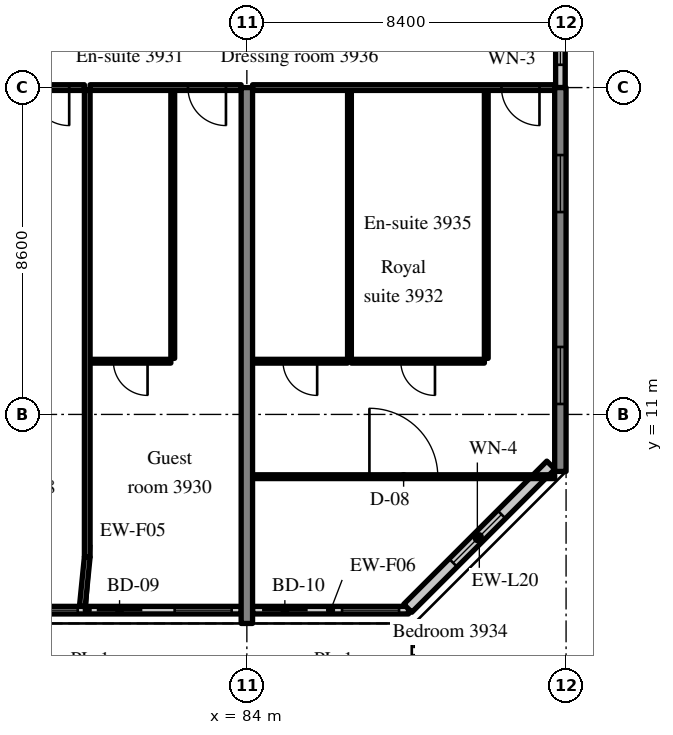
"""IFC4 building model, lengths in metres.
Left out: names, types, materials, properties, quantities, classifications, styles, units other than length and angle.
Written with IfcOpenShell. Run it as: python <this file> out.ifc"""

import sys

from ifc_helpers import new_model, si_unit, direction, frame, frame_2d, origin, place, context, subcontext, project, spatial, rectangle, extrude, source, transform, mapped, element, fill, save


model = new_model("IFC4")
c1 = context("Model", 3, precision=1e-05, world=origin(), true_north=direction((0.0, 1.0)))
c2 = subcontext(c1, "Body", "Model", "MODEL_VIEW")
j1 = project(units=[si_unit("LENGTHUNIT", "METRE"), si_unit("PLANEANGLEUNIT", "RADIAN")], contexts=[c1])
p1 = place(None, origin())
s1 = spatial("IfcSite", under=j1, at=p1, CompositionType="ELEMENT")
p2 = place(p1, origin())
s2 = spatial("IfcBuilding", under=s1, at=p2, CompositionType="ELEMENT")
p3 = place(p2, frame((0.0, 0.0, 163.0)))
s3 = spatial("IfcBuildingStorey", under=s2, at=p3, CompositionType="ELEMENT", Elevation=163.0)
m1 = source(origin(), c2, "Body", "SweptSolid", [
    extrude(rectangle(XDim=14.1, YDim=0.3, at=frame_2d((7.05, 0.0))), origin(), (0.0, 0.0, 1.0), 3.52),
])
p4 = place(p3, frame((84.0, 5.5, 0.0), z_axis=(0.0, 0.0, 1.0), x_axis=(0.0, 1.0, 0.0)))
e1 = element("IfcWall", 1, at=p4, inside=s3, PredefinedType="SHEAR", context=c2, shape_type="MappedRepresentation", body=[
    mapped(m1, transform((0.0, 0.0, 0.0), scale=1.0)),
])
m2 = source(origin(), c2, "Body", "SweptSolid", [
    extrude(rectangle(XDim=10.1, YDim=0.3, at=frame_2d((5.05, 0.0))), origin(), (0.0, 0.0, 1.0), 3.52),
])
p5 = place(p3, frame((92.25, 9.5, 0.0), z_axis=(0.0, 0.0, 1.0), x_axis=(0.0, 1.0, 0.0)))
e2 = element("IfcWall", 2, at=p5, inside=s3, PredefinedType="SHEAR", context=c2, shape_type="MappedRepresentation", body=[
    mapped(m2, transform((0.0, 0.0, 0.0), scale=1.0)),
])
m3 = source(origin(), c2, "Body", "SweptSolid", [
    extrude(rectangle(XDim=1.5, YDim=1.5, at=frame_2d((0.75, 0.75))), frame((0.0, 0.16, 0.0), z_axis=(0.0, -1.0, 0.0), x_axis=(1.0, 0.0, 0.0)), (0.0, 0.0, 1.0), 0.32),
])
p6 = place(p5, frame((1.775, 0.0, 0.9)))
e3 = element("IfcOpeningElement", 3, at=p6, cuts=e2, PredefinedType="OPENING", context=c2, shape_type="MappedRepresentation", body=[
    mapped(m3, transform((0.0, 0.0, 0.0), scale=1.0)),
])
p7 = place(p5, frame((6.825, 0.0, 0.9)))
e4 = element("IfcOpeningElement", 4, at=p7, cuts=e2, PredefinedType="OPENING", context=c2, shape_type="MappedRepresentation", body=[
    mapped(m3, transform((0.0, 0.0, 0.0), scale=1.0)),
])
m4 = source(origin(), c2, "Body", "SweptSolid", [
    extrude(rectangle(XDim=8.1, YDim=0.2, at=frame_2d((4.05, 0.0))), origin(), (0.0, 0.0, 1.0), 2.87),
])
p8 = place(p3, frame((75.75, 5.85, 0.0), z_axis=(0.0, 0.0, 1.0), x_axis=(1.0, 0.0, 0.0)))
e5 = element("IfcWall", 5, at=p8, inside=s3, PredefinedType="SOLIDWALL", context=c2, shape_type="MappedRepresentation", body=[
    mapped(m4, transform((0.0, 0.0, 0.0), scale=1.0)),
])
m5 = source(origin(), c2, "Body", "SweptSolid", [
    extrude(rectangle(XDim=1.2, YDim=2.4, at=frame_2d((0.6, 1.2))), frame((0.0, 0.11, 0.0), z_axis=(0.0, -1.0, 0.0), x_axis=(1.0, 0.0, 0.0)), (0.0, 0.0, 1.0), 0.22),
])
p9 = place(p8, frame((0.25, 0.0, 0.0)))
e6 = element("IfcOpeningElement", 6, at=p9, cuts=e5, PredefinedType="OPENING", context=c2, shape_type="MappedRepresentation", body=[
    mapped(m5, transform((0.0, 0.0, 0.0), scale=1.0)),
])
m6 = source(origin(), c2, "Body", "SweptSolid", [
    extrude(rectangle(XDim=1.5, YDim=1.5, at=frame_2d((0.75, 0.75))), frame((0.0, 0.11, 0.0), z_axis=(0.0, -1.0, 0.0), x_axis=(1.0, 0.0, 0.0)), (0.0, 0.0, 1.0), 0.22),
])
p10 = place(p8, frame((2.3, 0.0, 0.9)))
e7 = element("IfcOpeningElement", 7, at=p10, cuts=e5, PredefinedType="OPENING", context=c2, shape_type="MappedRepresentation", body=[
    mapped(m6, transform((0.0, 0.0, 0.0), scale=1.0)),
])
p11 = place(p8, frame((4.3, 0.0, 0.0)))
e8 = element("IfcOpeningElement", 8, at=p11, cuts=e5, PredefinedType="OPENING", context=c2, shape_type="MappedRepresentation", body=[
    mapped(m5, transform((0.0, 0.0, 0.0), scale=1.0)),
])
p12 = place(p8, frame((6.35, 0.0, 0.9)))
e9 = element("IfcOpeningElement", 9, at=p12, cuts=e5, PredefinedType="OPENING", context=c2, shape_type="MappedRepresentation", body=[
    mapped(m6, transform((0.0, 0.0, 0.0), scale=1.0)),
])
m7 = source(origin(), c2, "Body", "SweptSolid", [
    extrude(rectangle(XDim=4.105, YDim=0.2, at=frame_2d((2.052, 0.0))), origin(), (0.0, 0.0, 1.0), 2.87),
])
p13 = place(p3, frame((84.15, 5.85, 0.0), z_axis=(0.0, 0.0, 1.0), x_axis=(1.0, 0.0, 0.0)))
e10 = element("IfcWall", 10, at=p13, inside=s3, PredefinedType="SOLIDWALL", context=c2, shape_type="MappedRepresentation", body=[
    mapped(m7, transform((0.0, 0.0, 0.0), scale=1.0)),
])
p14 = place(p13, frame((0.25, 0.0, 0.0)))
e11 = element("IfcOpeningElement", 11, at=p14, cuts=e10, PredefinedType="OPENING", context=c2, shape_type="MappedRepresentation", body=[
    mapped(m5, transform((0.0, 0.0, 0.0), scale=1.0)),
])
p15 = place(p13, frame((2.355, 0.0, 0.9)))
e12 = element("IfcOpeningElement", 12, at=p15, cuts=e10, PredefinedType="OPENING", context=c2, shape_type="MappedRepresentation", body=[
    mapped(m6, transform((0.0, 0.0, 0.0), scale=1.0)),
])
m8 = source(origin(), c2, "Body", "SweptSolid", [
    extrude(rectangle(XDim=5.326, YDim=0.3, at=frame_2d((2.663, 0.0))), origin(), (0.0, 0.0, 1.0), 3.52),
])
p16 = place(p3, frame((88.234, 5.9, 0.0), z_axis=(0.0, 0.0, 1.0), x_axis=(0.707083859269, 0.707129702361, 0.0)))
e13 = element("IfcWall", 13, at=p16, inside=s3, PredefinedType="SOLIDWALL", context=c2, shape_type="MappedRepresentation", body=[
    mapped(m8, transform((0.0, 0.0, 0.0), scale=1.0)),
])
m9 = source(origin(), c2, "Body", "SweptSolid", [
    extrude(rectangle(XDim=1.8, YDim=1.5, at=frame_2d((0.9, 0.75))), frame((0.0, 0.16, 0.0), z_axis=(0.0, -1.0, 0.0), x_axis=(1.0, 0.0, 0.0)), (0.0, 0.0, 1.0), 0.32),
])
p17 = place(p16, frame((1.689, 0.0, 0.9)))
e14 = element("IfcOpeningElement", 14, at=p17, cuts=e13, PredefinedType="OPENING", context=c2, shape_type="MappedRepresentation", body=[
    mapped(m9, transform((0.0, 0.0, 0.0), scale=1.0)),
])
m10 = source(origin(), c2, "Body", "SweptSolid", [
    extrude(rectangle(XDim=2.4, YDim=0.25, at=frame_2d((1.2, 0.0))), origin(), (0.0, 0.0, 1.0), 2.62),
])
p18 = place(p3, frame((92.25, 19.6, 0.0), z_axis=(0.0, 0.0, 1.0), x_axis=(0.0, 1.0, 0.0)))
e15 = element("IfcWall", 15, at=p18, inside=s3, PredefinedType="SOLIDWALL", context=c2, shape_type="MappedRepresentation", body=[
    mapped(m10, transform((0.0, 0.0, 0.0), scale=1.0)),
])
m11 = source(origin(), c2, "Body", "SweptSolid", [
    extrude(rectangle(XDim=1.2, YDim=1.5, at=frame_2d((0.6, 0.75))), frame((0.0, 0.135, 0.0), z_axis=(0.0, -1.0, 0.0), x_axis=(1.0, 0.0, 0.0)), (0.0, 0.0, 1.0), 0.27),
])
p19 = place(p18, frame((0.6, 0.0, 0.9)))
e16 = element("IfcOpeningElement", 16, at=p19, cuts=e15, PredefinedType="OPENING", context=c2, shape_type="MappedRepresentation", body=[
    mapped(m11, transform((0.0, 0.0, 0.0), scale=1.0)),
])
m12 = source(origin(), c2, "Body", "SweptSolid", [
    extrude(rectangle(XDim=3.975, YDim=0.15, at=frame_2d((1.988, 0.0))), origin(), (0.0, 0.0, 1.0), 2.82),
])
p20 = place(p3, frame((75.75, 19.6, 0.0), z_axis=(0.0, 0.0, 1.0), x_axis=(1.0, 0.0, 0.0)))
e17 = element("IfcWall", 17, at=p20, inside=s3, PredefinedType="PARTITIONING", context=c2, shape_type="MappedRepresentation", body=[
    mapped(m12, transform((0.0, 0.0, 0.0), scale=1.0)),
])
m13 = source(origin(), c2, "Body", "SweptSolid", [
    extrude(rectangle(XDim=1.0, YDim=2.1, at=frame_2d((0.5, 1.05))), frame((0.0, 0.085, 0.0), z_axis=(0.0, -1.0, 0.0), x_axis=(1.0, 0.0, 0.0)), (0.0, 0.0, 1.0), 0.17),
])
p21 = place(p20, frame((2.575, 0.0, 0.0)))
e18 = element("IfcOpeningElement", 18, at=p21, cuts=e17, PredefinedType="OPENING", context=c2, shape_type="MappedRepresentation", body=[
    mapped(m13, transform((0.0, 0.0, 0.0), scale=1.0)),
])
m14 = source(origin(), c2, "Body", "SweptSolid", [
    extrude(rectangle(XDim=7.05, YDim=0.1, at=frame_2d((3.525, 0.0))), origin(), (0.0, 0.0, 1.0), 3.52),
])
p22 = place(p3, frame((82.05, 12.475, 0.0), z_axis=(0.0, 0.0, 1.0), x_axis=(0.0, 1.0, 0.0)))
e19 = element("IfcWall", 19, at=p22, inside=s3, PredefinedType="PARTITIONING", context=c2, shape_type="MappedRepresentation", body=[
    mapped(m14, transform((0.0, 0.0, 0.0), scale=1.0)),
])
m15 = source(origin(), c2, "Body", "SweptSolid", [
    extrude(rectangle(XDim=2.125, YDim=0.1, at=frame_2d((1.062, 0.0))), origin(), (0.0, 0.0, 1.0), 3.52),
])
p23 = place(p3, frame((79.875, 12.4, 0.0), z_axis=(0.0, 0.0, 1.0), x_axis=(1.0, 0.0, 0.0)))
e20 = element("IfcWall", 20, at=p23, inside=s3, PredefinedType="PARTITIONING", context=c2, shape_type="MappedRepresentation", body=[
    mapped(m15, transform((0.0, 0.0, 0.0), scale=1.0)),
])
m16 = source(origin(), c2, "Body", "SweptSolid", [
    extrude(rectangle(XDim=0.9, YDim=2.1, at=frame_2d((0.45, 1.05))), frame((0.0, 0.06, 0.0), z_axis=(0.0, -1.0, 0.0), x_axis=(1.0, 0.0, 0.0)), (0.0, 0.0, 1.0), 0.12),
])
p24 = place(p23, frame((0.612, 0.0, 0.0)))
e21 = element("IfcOpeningElement", 21, at=p24, cuts=e20, PredefinedType="OPENING", context=c2, shape_type="MappedRepresentation", body=[
    mapped(m16, transform((0.0, 0.0, 0.0), scale=1.0)),
])
p25 = place(p3, frame((79.875, 19.6, 0.0), z_axis=(0.0, 0.0, 1.0), x_axis=(1.0, 0.0, 0.0)))
e22 = element("IfcWall", 22, at=p25, inside=s3, PredefinedType="PARTITIONING", context=c2, shape_type="MappedRepresentation", body=[
    mapped(m12, transform((0.0, 0.0, 0.0), scale=1.0)),
])
p26 = place(p25, frame((2.575, 0.0, 0.0)))
e23 = element("IfcOpeningElement", 23, at=p26, cuts=e22, PredefinedType="OPENING", context=c2, shape_type="MappedRepresentation", body=[
    mapped(m13, transform((0.0, 0.0, 0.0), scale=1.0)),
])
m17 = source(origin(), c2, "Body", "SweptSolid", [
    extrude(rectangle(XDim=12.275, YDim=0.15, at=frame_2d((6.137, 0.0))), origin(), (0.0, 0.0, 1.0), 3.52),
])
p27 = place(p3, frame((79.8, 7.25, 0.0), z_axis=(0.0, 0.0, 1.0), x_axis=(0.0, 1.0, 0.0)))
e24 = element("IfcWall", 24, at=p27, inside=s3, PredefinedType="PARTITIONING", context=c2, shape_type="MappedRepresentation", body=[
    mapped(m17, transform((0.0, 0.0, 0.0), scale=1.0)),
])
for number, where, z_axis, x_axis in (
    (25, (90.3, 12.475, 0.0), (0.0, 0.0, 1.0), (0.0, 1.0, 0.0)),
    (26, (86.7, 12.475, 0.0), (0.0, 0.0, 1.0), (0.0, 1.0, 0.0)),
):
    element("IfcWall", number, at=place(p3, frame(where, z_axis=z_axis, x_axis=x_axis)), inside=s3, PredefinedType="PARTITIONING", context=c2, shape_type="MappedRepresentation", body=[
        mapped(m14, transform((0.0, 0.0, 0.0), scale=1.0)),
    ])
m18 = source(origin(), c2, "Body", "SweptSolid", [
    extrude(rectangle(XDim=3.5, YDim=0.1, at=frame_2d((1.75, 0.0))), origin(), (0.0, 0.0, 1.0), 3.52),
])
p28 = place(p3, frame((86.75, 12.4, 0.0), z_axis=(0.0, 0.0, 1.0), x_axis=(1.0, 0.0, 0.0)))
e27 = element("IfcWall", 27, at=p28, inside=s3, PredefinedType="PARTITIONING", context=c2, shape_type="MappedRepresentation", body=[
    mapped(m18, transform((0.0, 0.0, 0.0), scale=1.0)),
])
p29 = place(p28, frame((1.3, 0.0, 0.0)))
e28 = element("IfcOpeningElement", 28, at=p29, cuts=e27, PredefinedType="OPENING", context=c2, shape_type="MappedRepresentation", body=[
    mapped(m16, transform((0.0, 0.0, 0.0), scale=1.0)),
])
m19 = source(origin(), c2, "Body", "SweptSolid", [
    extrude(rectangle(XDim=2.5, YDim=0.1, at=frame_2d((1.25, 0.0))), origin(), (0.0, 0.0, 1.0), 3.52),
])
p30 = place(p3, frame((84.15, 12.4, 0.0), z_axis=(0.0, 0.0, 1.0), x_axis=(1.0, 0.0, 0.0)))
e29 = element("IfcWall", 29, at=p30, inside=s3, PredefinedType="PARTITIONING", context=c2, shape_type="MappedRepresentation", body=[
    mapped(m19, transform((0.0, 0.0, 0.0), scale=1.0)),
])
p31 = place(p30, frame((0.8, 0.0, 0.0)))
e30 = element("IfcOpeningElement", 30, at=p31, cuts=e29, PredefinedType="OPENING", context=c2, shape_type="MappedRepresentation", body=[
    mapped(m16, transform((0.0, 0.0, 0.0), scale=1.0)),
])
m20 = source(origin(), c2, "Body", "SweptSolid", [
    extrude(rectangle(XDim=7.95, YDim=0.1, at=frame_2d((3.975, 0.0))), origin(), (0.0, 0.0, 1.0), 3.52),
])
p32 = place(p3, frame((84.15, 9.362, 0.0), z_axis=(0.0, 0.0, 1.0), x_axis=(1.0, 0.0, 0.0)))
e31 = element("IfcWall", 31, at=p32, inside=s3, PredefinedType="PARTITIONING", context=c2, shape_type="MappedRepresentation", body=[
    mapped(m20, transform((0.0, 0.0, 0.0), scale=1.0)),
])
m21 = source(origin(), c2, "Body", "SweptSolid", [
    extrude(rectangle(XDim=1.8, YDim=2.1, at=frame_2d((0.9, 1.05))), frame((0.0, 0.06, 0.0), z_axis=(0.0, -1.0, 0.0), x_axis=(1.0, 0.0, 0.0)), (0.0, 0.0, 1.0), 0.12),
])
p33 = place(p32, frame((3.075, 0.0, 0.0)))
e32 = element("IfcOpeningElement", 32, at=p33, cuts=e31, PredefinedType="OPENING", context=c2, shape_type="MappedRepresentation", body=[
    mapped(m21, transform((0.0, 0.0, 0.0), scale=1.0)),
])
m22 = source(origin(), c2, "Body", "SweptSolid", [
    extrude(rectangle(XDim=7.95, YDim=0.15, at=frame_2d((3.975, 0.0))), origin(), (0.0, 0.0, 1.0), 2.82),
])
p34 = place(p3, frame((84.15, 19.6, 0.0), z_axis=(0.0, 0.0, 1.0), x_axis=(1.0, 0.0, 0.0)))
e33 = element("IfcWall", 33, at=p34, inside=s3, PredefinedType="PARTITIONING", context=c2, shape_type="MappedRepresentation", body=[
    mapped(m22, transform((0.0, 0.0, 0.0), scale=1.0)),
])
p35 = place(p34, frame((6.55, 0.0, 0.0)))
e34 = element("IfcOpeningElement", 34, at=p35, cuts=e33, PredefinedType="OPENING", context=c2, shape_type="MappedRepresentation", body=[
    mapped(m13, transform((0.0, 0.0, 0.0), scale=1.0)),
])
m23 = source(origin(), c2, "Body", "SweptSolid", [
    extrude(rectangle(XDim=1.307, YDim=0.15, at=frame_2d((0.653, 0.0))), origin(), (0.0, 0.0, 1.0), 3.52),
])
p36 = place(p3, frame((79.67, 5.95, 0.0), z_axis=(0.0, 0.0, 1.0), x_axis=(0.099596223396, 0.99502793543, 0.0)))
e35 = element("IfcWall", 35, at=p36, inside=s3, PredefinedType="PARTITIONING", context=c2, shape_type="MappedRepresentation", body=[
    mapped(m23, transform((0.0, 0.0, 0.0), scale=1.0)),
])
m24 = source(origin(), c2, "Body", "SweptSolid", [
    extrude(rectangle(XDim=1.5, YDim=1.5, at=frame_2d((0.75, 0.75))), frame((0.0, 0.03, 0.0), z_axis=(0.0, -1.0, 0.0), x_axis=(1.0, 0.0, 0.0)), (0.0, 0.0, 1.0), 0.06),
])
p37 = place(p10, origin())
e36 = element("IfcWindow", 36, at=p37, inside=s3, PartitioningType="SINGLE_PANEL", PredefinedType="WINDOW", context=c2, shape_type="MappedRepresentation", body=[
    mapped(m24, transform((0.0, 0.0, 0.0), scale=1.0)),
])
fill(e7, e36)
m25 = source(origin(), c2, "Body", "SweptSolid", [
    extrude(rectangle(XDim=1.2, YDim=2.4, at=frame_2d((0.6, 1.2))), frame((0.0, 0.025, 0.0), z_axis=(0.0, -1.0, 0.0), x_axis=(1.0, 0.0, 0.0)), (0.0, 0.0, 1.0), 0.05),
])
p38 = place(p11, origin())
e37 = element("IfcDoor", 37, at=p38, inside=s3, OperationType="SLIDING_TO_LEFT", PredefinedType="DOOR", context=c2, shape_type="MappedRepresentation", body=[
    mapped(m25, transform((0.0, 0.0, 0.0), scale=1.0)),
])
fill(e8, e37)
p39 = place(p12, origin())
e38 = element("IfcWindow", 38, at=p39, inside=s3, PartitioningType="SINGLE_PANEL", PredefinedType="WINDOW", context=c2, shape_type="MappedRepresentation", body=[
    mapped(m24, transform((0.0, 0.0, 0.0), scale=1.0)),
])
fill(e9, e38)
p40 = place(p14, origin())
e39 = element("IfcDoor", 39, at=p40, inside=s3, OperationType="SLIDING_TO_RIGHT", PredefinedType="DOOR", context=c2, shape_type="MappedRepresentation", body=[
    mapped(m25, transform((0.0, 0.0, 0.0), scale=1.0)),
])
fill(e11, e39)
p41 = place(p15, origin())
e40 = element("IfcWindow", 40, at=p41, inside=s3, PartitioningType="SINGLE_PANEL", PredefinedType="WINDOW", context=c2, shape_type="MappedRepresentation", body=[
    mapped(m24, transform((0.0, 0.0, 0.0), scale=1.0)),
])
fill(e12, e40)
m26 = source(origin(), c2, "Body", "SweptSolid", [
    extrude(rectangle(XDim=1.8, YDim=1.5, at=frame_2d((0.9, 0.75))), frame((0.0, 0.03, 0.0), z_axis=(0.0, -1.0, 0.0), x_axis=(1.0, 0.0, 0.0)), (0.0, 0.0, 1.0), 0.06),
])
p42 = place(p17, origin())
e41 = element("IfcWindow", 41, at=p42, inside=s3, PartitioningType="SINGLE_PANEL", PredefinedType="WINDOW", context=c2, shape_type="MappedRepresentation", body=[
    mapped(m26, transform((0.0, 0.0, 0.0), scale=1.0)),
])
fill(e14, e41)
p43 = place(p6, origin())
e42 = element("IfcWindow", 42, at=p43, inside=s3, PartitioningType="SINGLE_PANEL", PredefinedType="WINDOW", context=c2, shape_type="MappedRepresentation", body=[
    mapped(m24, transform((0.0, 0.0, 0.0), scale=1.0)),
])
fill(e3, e42)
p44 = place(p7, origin())
e43 = element("IfcWindow", 43, at=p44, inside=s3, PartitioningType="SINGLE_PANEL", PredefinedType="WINDOW", context=c2, shape_type="MappedRepresentation", body=[
    mapped(m24, transform((0.0, 0.0, 0.0), scale=1.0)),
])
fill(e4, e43)
m27 = source(origin(), c2, "Body", "SweptSolid", [
    extrude(rectangle(XDim=1.2, YDim=1.5, at=frame_2d((0.6, 0.75))), frame((0.0, 0.03, 0.0), z_axis=(0.0, -1.0, 0.0), x_axis=(1.0, 0.0, 0.0)), (0.0, 0.0, 1.0), 0.06),
])
p45 = place(p19, origin())
e44 = element("IfcWindow", 44, at=p45, inside=s3, PartitioningType="SINGLE_PANEL", PredefinedType="WINDOW", context=c2, shape_type="MappedRepresentation", body=[
    mapped(m27, transform((0.0, 0.0, 0.0), scale=1.0)),
])
fill(e16, e44)
m28 = source(origin(), c2, "Body", "SweptSolid", [
    extrude(rectangle(XDim=1.0, YDim=2.1, at=frame_2d((0.5, 1.05))), frame((0.0, 0.025, 0.0), z_axis=(0.0, -1.0, 0.0), x_axis=(1.0, 0.0, 0.0)), (0.0, 0.0, 1.0), 0.05),
])
p46 = place(p21, origin())
e45 = element("IfcDoor", 45, at=p46, inside=s3, OperationType="SINGLE_SWING_RIGHT", PredefinedType="DOOR", context=c2, shape_type="MappedRepresentation", body=[
    mapped(m28, transform((0.0, 0.0, 0.0), scale=1.0)),
])
fill(e18, e45)
m29 = source(origin(), c2, "Body", "SweptSolid", [
    extrude(rectangle(XDim=0.9, YDim=2.1, at=frame_2d((0.45, 1.05))), frame((0.0, 0.025, 0.0), z_axis=(0.0, -1.0, 0.0), x_axis=(1.0, 0.0, 0.0)), (0.0, 0.0, 1.0), 0.05),
])
p47 = place(p24, origin())
e46 = element("IfcDoor", 46, at=p47, inside=s3, OperationType="SINGLE_SWING_RIGHT", PredefinedType="DOOR", context=c2, shape_type="MappedRepresentation", body=[
    mapped(m29, transform((0.0, 0.0, 0.0), scale=1.0)),
])
fill(e21, e46)
p48 = place(p26, origin())
e47 = element("IfcDoor", 47, at=p48, inside=s3, OperationType="SINGLE_SWING_RIGHT", PredefinedType="DOOR", context=c2, shape_type="MappedRepresentation", body=[
    mapped(m28, transform((0.0, 0.0, 0.0), scale=1.0)),
])
fill(e23, e47)
p49 = place(p29, origin())
e48 = element("IfcDoor", 48, at=p49, inside=s3, OperationType="SINGLE_SWING_RIGHT", PredefinedType="DOOR", context=c2, shape_type="MappedRepresentation", body=[
    mapped(m29, transform((0.0, 0.0, 0.0), scale=1.0)),
])
fill(e28, e48)
p50 = place(p31, origin())
e49 = element("IfcDoor", 49, at=p50, inside=s3, OperationType="SINGLE_SWING_RIGHT", PredefinedType="DOOR", context=c2, shape_type="MappedRepresentation", body=[
    mapped(m29, transform((0.0, 0.0, 0.0), scale=1.0)),
])
fill(e30, e49)
m30 = source(origin(), c2, "Body", "SweptSolid", [
    extrude(rectangle(XDim=1.8, YDim=2.1, at=frame_2d((0.9, 1.05))), frame((0.0, 0.025, 0.0), z_axis=(0.0, -1.0, 0.0), x_axis=(1.0, 0.0, 0.0)), (0.0, 0.0, 1.0), 0.05),
])
p51 = place(p33, origin())
e50 = element("IfcDoor", 50, at=p51, inside=s3, OperationType="DOUBLE_DOOR_SINGLE_SWING", PredefinedType="DOOR", context=c2, shape_type="MappedRepresentation", body=[
    mapped(m30, transform((0.0, 0.0, 0.0), scale=1.0)),
])
fill(e32, e50)
p52 = place(p35, origin())
e51 = element("IfcDoor", 51, at=p52, inside=s3, OperationType="SINGLE_SWING_RIGHT", PredefinedType="DOOR", context=c2, shape_type="MappedRepresentation", body=[
    mapped(m28, transform((0.0, 0.0, 0.0), scale=1.0)),
])
fill(e34, e51)
save(model, sys.argv[1])
